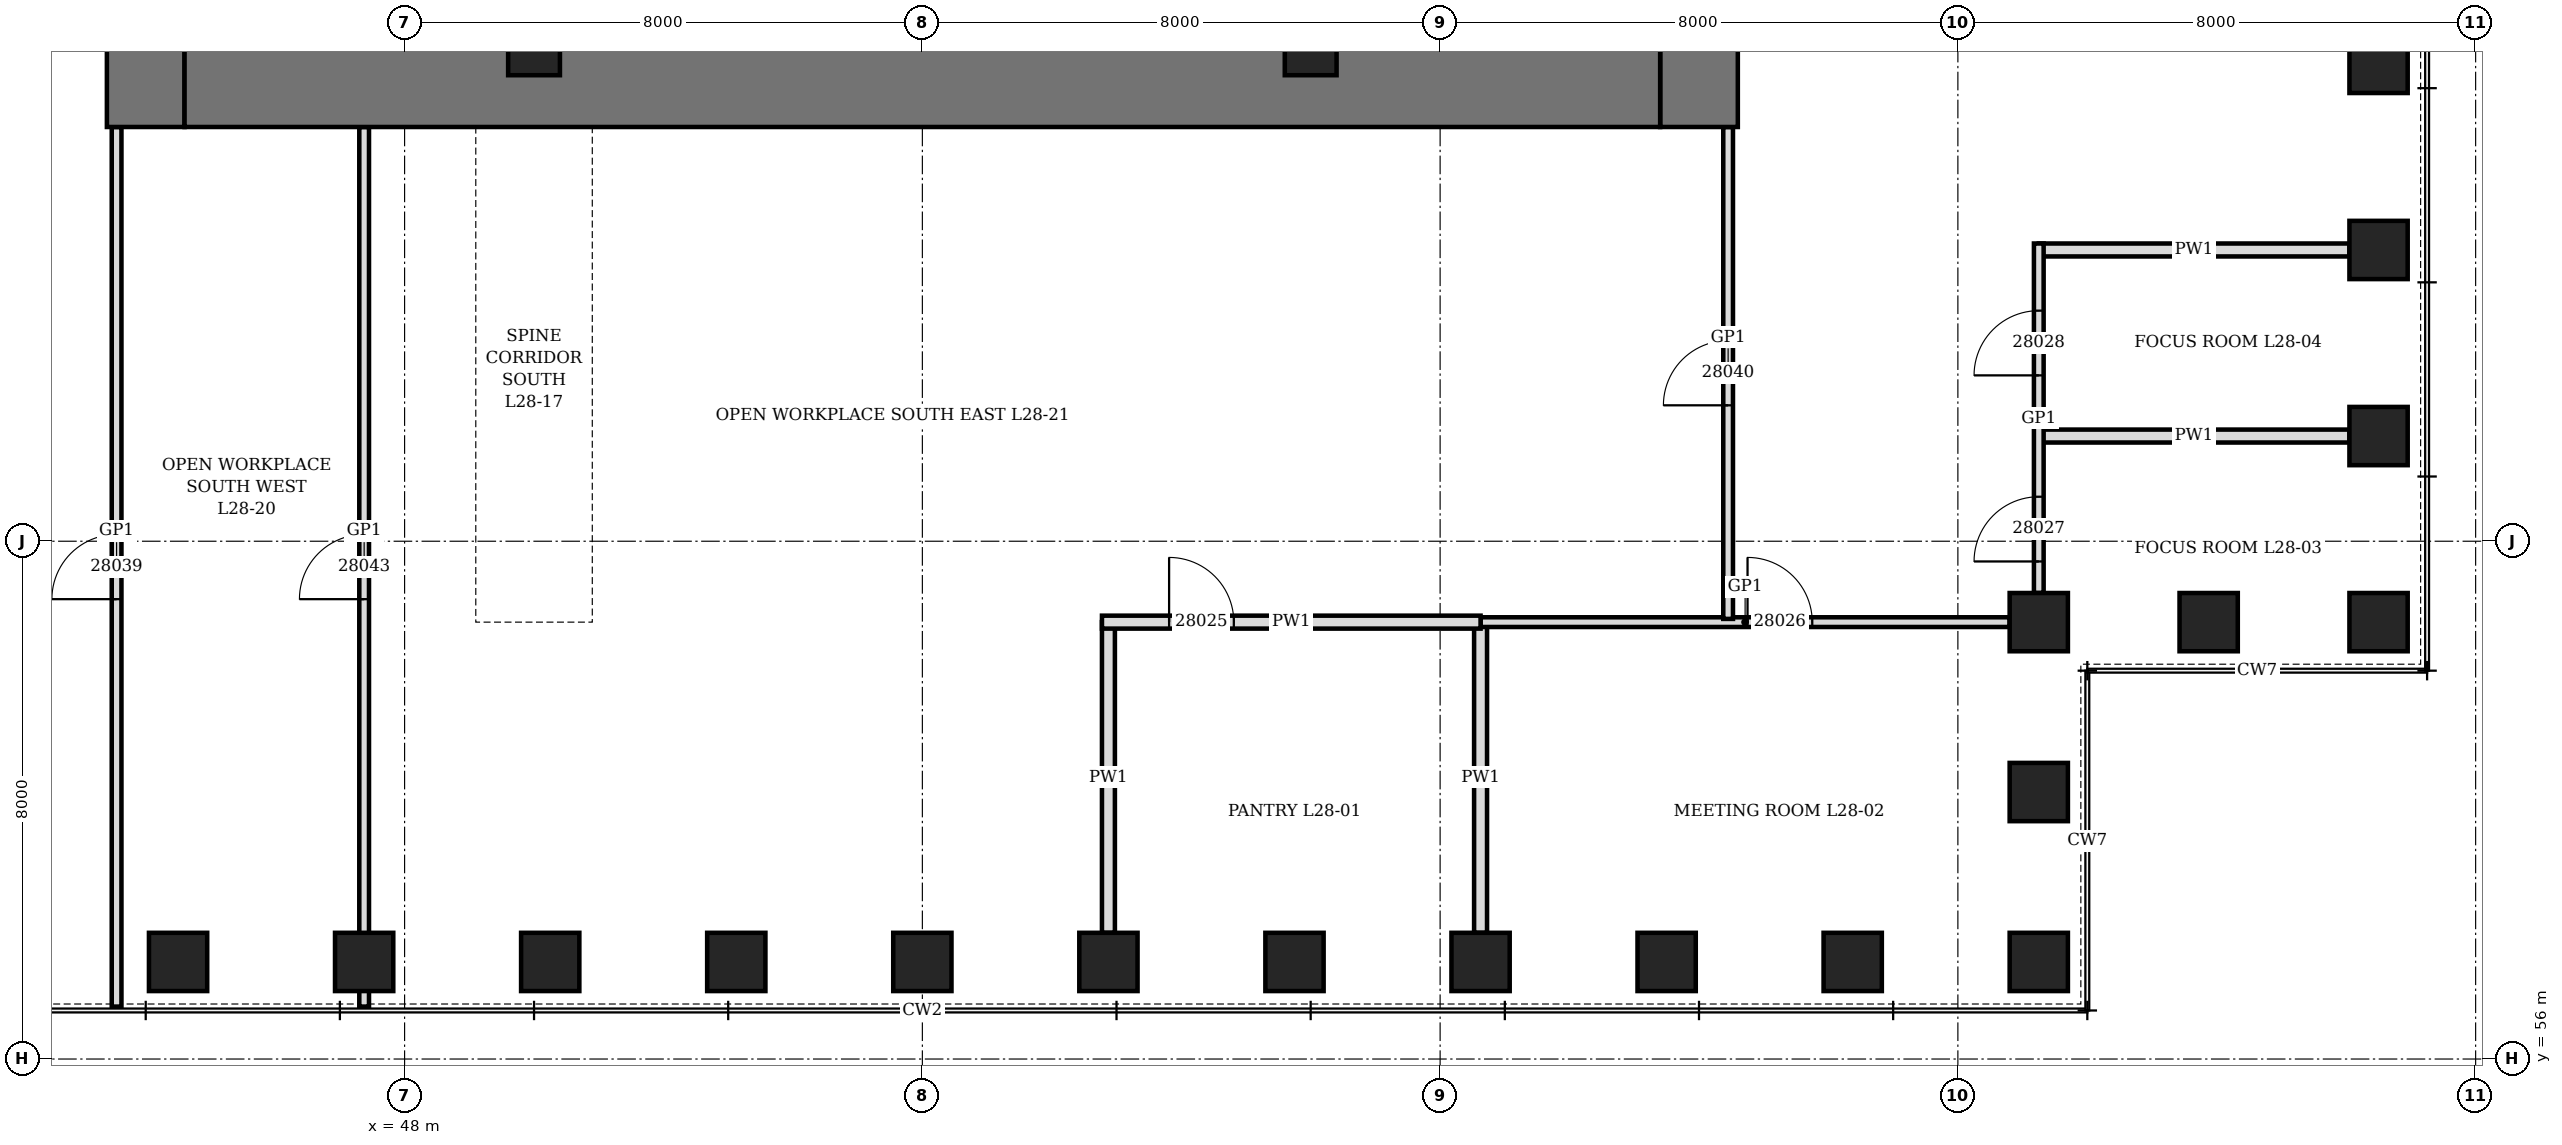
"""IFC4 building model, lengths in metres.
Left out: names, types, materials, properties, quantities, classifications, styles, units other than length and angle.
Written with IfcOpenShell. Run it as: python <this file> out.ifc"""

import sys

from ifc_helpers import new_model, si_unit, direction, frame, frame_2d, origin, origin_2d, place, context, subcontext, project, spatial, rectangle, hollow_rectangle, extrude, element, fill, save


model = new_model("IFC4")
c1 = context("Model", 3, precision=1e-05, world=origin(), true_north=direction((0.0, 1.0)))
c2 = subcontext(c1, "Body", "Model", "MODEL_VIEW")
j1 = project(units=[si_unit("LENGTHUNIT", "METRE"), si_unit("PLANEANGLEUNIT", "RADIAN")], contexts=[c1])
p1 = place(None, origin())
s1 = spatial("IfcSite", under=j1, at=p1, CompositionType="ELEMENT")
p2 = place(p1, origin())
s2 = spatial("IfcBuilding", under=s1, at=p2, CompositionType="ELEMENT")
p3 = place(p2, frame((0.0, 0.0, 129.1)))
s3 = spatial("IfcBuildingStorey", under=s2, at=p3, CompositionType="ELEMENT", Elevation=129.1)
for number, where, z_axis, x_axis in (
    (1, (44.5, 57.5, 0.0), (0.0, 0.0, 1.0), (1.0, 0.0, 0.0)),
    (2, (47.375, 57.5, 0.0), (0.0, 0.0, 1.0), (1.0, 0.0, 0.0)),
    (3, (50.25, 57.5, 0.0), (0.0, 0.0, 1.0), (1.0, 0.0, 0.0)),
    (4, (53.125, 57.5, 0.0), (0.0, 0.0, 1.0), (1.0, 0.0, 0.0)),
    (5, (56.0, 57.5, 0.0), (0.0, 0.0, 1.0), (1.0, 0.0, 0.0)),
    (6, (58.875, 57.5, 0.0), (0.0, 0.0, 1.0), (1.0, 0.0, 0.0)),
    (7, (61.75, 57.5, 0.0), (0.0, 0.0, 1.0), (1.0, 0.0, 0.0)),
    (8, (64.625, 57.5, 0.0), (0.0, 0.0, 1.0), (1.0, 0.0, 0.0)),
    (9, (67.5, 57.5, 0.0), (0.0, 0.0, 1.0), (1.0, 0.0, 0.0)),
    (10, (70.375, 57.5, 0.0), (0.0, 0.0, 1.0), (1.0, 0.0, 0.0)),
    (11, (73.25, 57.5, 0.0), (0.0, 0.0, 1.0), (0.0, 1.0, 0.0)),
    (12, (73.25, 60.125, 0.0), (0.0, 0.0, 1.0), (0.0, 1.0, 0.0)),
    (13, (73.25, 62.75, 0.0), (0.0, 0.0, 1.0), (1.0, 0.0, 0.0)),
    (14, (75.875, 62.75, 0.0), (0.0, 0.0, 1.0), (1.0, 0.0, 0.0)),
    (15, (78.5, 62.75, 0.0), (0.0, 0.0, 1.0), (0.0, 1.0, 0.0)),
    (16, (78.5, 65.625, 0.0), (0.0, 0.0, 1.0), (0.0, 1.0, 0.0)),
    (17, (78.5, 68.5, 0.0), (0.0, 0.0, 1.0), (0.0, 1.0, 0.0)),
    (18, (78.5, 71.375, 0.0), (0.0, 0.0, 1.0), (0.0, 1.0, 0.0)),
):
    element("IfcColumn", number, at=place(p3, frame(where, z_axis=z_axis, x_axis=x_axis)), inside=s3, PredefinedType="COLUMN", context=c2, shape_type="SweptSolid", body=[
        extrude(hollow_rectangle(XDim=0.9, YDim=0.9, WallThickness=0.15, at=origin_2d()), origin(), (0.0, 0.0, 1.0), 4.2),
    ])
p4 = place(p3, frame((44.0, 70.4, 0.0), z_axis=(0.0, 0.0, 1.0), x_axis=(0.0, 1.0, 0.0)))
e19 = element("IfcWall", 19, at=p4, inside=s3, PredefinedType="SHEAR", context=c2, shape_type="SweptSolid", body=[
    extrude(rectangle(XDim=19.2, YDim=1.2, at=frame_2d((9.6, 0.0))), origin(), (0.0, 0.0, 1.0), 4.2),
])
p5 = place(p4, frame((8.6, 0.0, 0.0)))
e20 = element("IfcOpeningElement", 20, at=p5, cuts=e19, PredefinedType="OPENING", context=c2, shape_type="SweptSolid", body=[
    extrude(rectangle(XDim=2.0, YDim=2.4, at=frame_2d((1.0, 1.2))), frame((0.0, 0.61, 0.0), z_axis=(0.0, -1.0, 0.0), x_axis=(1.0, 0.0, 0.0)), (0.0, 0.0, 1.0), 1.22),
])
p6 = place(p3, frame((68.0, 70.4, 0.0), z_axis=(0.0, 0.0, 1.0), x_axis=(0.0, 1.0, 0.0)))
e21 = element("IfcWall", 21, at=p6, inside=s3, PredefinedType="SHEAR", context=c2, shape_type="SweptSolid", body=[
    extrude(rectangle(XDim=19.2, YDim=1.2, at=frame_2d((9.6, 0.0))), origin(), (0.0, 0.0, 1.0), 4.2),
])
p7 = place(p6, frame((8.6, 0.0, 0.0)))
e22 = element("IfcOpeningElement", 22, at=p7, cuts=e21, PredefinedType="OPENING", context=c2, shape_type="SweptSolid", body=[
    extrude(rectangle(XDim=2.0, YDim=2.4, at=frame_2d((1.0, 1.2))), frame((0.0, 0.61, 0.0), z_axis=(0.0, -1.0, 0.0), x_axis=(1.0, 0.0, 0.0)), (0.0, 0.0, 1.0), 1.22),
])
p8 = place(p3, frame((44.6, 71.0, 0.0), z_axis=(0.0, 0.0, 1.0), x_axis=(1.0, 0.0, 0.0)))
e23 = element("IfcWall", 23, at=p8, inside=s3, PredefinedType="SHEAR", context=c2, shape_type="SweptSolid", body=[
    extrude(rectangle(XDim=22.8, YDim=1.2, at=frame_2d((11.4, 0.0))), origin(), (0.0, 0.0, 1.0), 4.2),
])
for number, where, z_axis, x_axis in (
    (24, (50.0, 71.6, 0.0), (0.0, 0.0, 1.0), (1.0, 0.0, 0.0)),
    (25, (62.0, 71.6, 0.0), (0.0, 0.0, 1.0), (1.0, 0.0, 0.0)),
):
    element("IfcColumn", number, at=place(p3, frame(where, z_axis=z_axis, x_axis=x_axis)), inside=s3, PredefinedType="COLUMN", context=c2, shape_type="SweptSolid", body=[
        extrude(hollow_rectangle(XDim=0.8, YDim=0.8, WallThickness=0.1, at=origin_2d()), origin(), (0.0, 0.0, 1.0), 4.2),
    ])
for number, where, z_axis, x_axis in (
    (26, (58.875, 57.95, 0.0), (0.0, 0.0, 1.0), (0.0, 1.0, 0.0)),
    (27, (64.625, 57.95, 0.0), (0.0, 0.0, 1.0), (0.0, 1.0, 0.0)),
):
    element("IfcWall", number, at=place(p3, frame(where, z_axis=z_axis, x_axis=x_axis)), inside=s3, PredefinedType="PARTITIONING", context=c2, shape_type="SweptSolid", body=[
        extrude(rectangle(XDim=4.8, YDim=0.2, at=frame_2d((2.4, 0.0))), origin(), (0.0, 0.0, 1.0), 3.278),
    ])
for number, where, z_axis, x_axis in (
    (28, (73.25, 65.625, 0.0), (0.0, 0.0, 1.0), (1.0, 0.0, 0.0)),
    (29, (73.25, 68.5, 0.0), (0.0, 0.0, 1.0), (1.0, 0.0, 0.0)),
):
    element("IfcWall", number, at=place(p3, frame(where, z_axis=z_axis, x_axis=x_axis)), inside=s3, PredefinedType="PARTITIONING", context=c2, shape_type="SweptSolid", body=[
        extrude(rectangle(XDim=4.8, YDim=0.2, at=frame_2d((2.4, 0.0))), origin(), (0.0, 0.0, 1.0), 3.428),
    ])
p9 = place(p3, frame((64.625, 62.75, 0.0), z_axis=(0.0, 0.0, 1.0), x_axis=(1.0, 0.0, 0.0)))
e30 = element("IfcWall", 30, at=p9, inside=s3, PredefinedType="PARTITIONING", context=c2, shape_type="SweptSolid", body=[
    extrude(rectangle(XDim=8.175, YDim=0.15, at=frame_2d((4.087, 0.0))), origin(), (0.0, 0.0, 1.0), 4.04),
])
p10 = place(p9, frame((4.125, 0.0, 0.0)))
e31 = element("IfcOpeningElement", 31, at=p10, cuts=e30, PredefinedType="OPENING", context=c2, shape_type="SweptSolid", body=[
    extrude(rectangle(XDim=1.0, YDim=2.4, at=frame_2d((0.5, 1.2))), frame((0.0, 0.085, 0.0), z_axis=(0.0, -1.0, 0.0), x_axis=(1.0, 0.0, 0.0)), (0.0, 0.0, 1.0), 0.17),
])
p11 = place(p3, frame((58.775, 62.75, 0.0), z_axis=(0.0, 0.0, 1.0), x_axis=(1.0, 0.0, 0.0)))
e32 = element("IfcWall", 32, at=p11, inside=s3, PredefinedType="PARTITIONING", context=c2, shape_type="SweptSolid", body=[
    extrude(rectangle(XDim=5.85, YDim=0.2, at=frame_2d((2.925, 0.0))), origin(), (0.0, 0.0, 1.0), 4.04),
])
p12 = place(p11, frame((1.038, 0.0, 0.0)))
e33 = element("IfcOpeningElement", 33, at=p12, cuts=e32, PredefinedType="OPENING", context=c2, shape_type="SweptSolid", body=[
    extrude(rectangle(XDim=1.0, YDim=2.1, at=frame_2d((0.5, 1.05))), frame((0.0, 0.11, 0.0), z_axis=(0.0, -1.0, 0.0), x_axis=(1.0, 0.0, 0.0)), (0.0, 0.0, 1.0), 0.22),
])
p13 = place(p3, frame((43.55, 56.81, 0.0), z_axis=(0.0, 0.0, 1.0), x_axis=(0.0, 1.0, 0.0)))
e34 = element("IfcWall", 34, at=p13, inside=s3, PredefinedType="PARTITIONING", context=c2, shape_type="SweptSolid", body=[
    extrude(rectangle(XDim=13.59, YDim=0.15, at=frame_2d((6.795, 0.0))), origin(), (0.0, 0.0, 1.0), 4.04),
])
p14 = place(p13, frame((6.295, 0.0, 0.0)))
e35 = element("IfcOpeningElement", 35, at=p14, cuts=e34, PredefinedType="OPENING", context=c2, shape_type="SweptSolid", body=[
    extrude(rectangle(XDim=1.0, YDim=2.4, at=frame_2d((0.5, 1.2))), frame((0.0, 0.085, 0.0), z_axis=(0.0, -1.0, 0.0), x_axis=(1.0, 0.0, 0.0)), (0.0, 0.0, 1.0), 0.17),
])
p15 = place(p3, frame((47.375, 56.81, 0.0), z_axis=(0.0, 0.0, 1.0), x_axis=(0.0, 1.0, 0.0)))
e36 = element("IfcWall", 36, at=p15, inside=s3, PredefinedType="PARTITIONING", context=c2, shape_type="SweptSolid", body=[
    extrude(rectangle(XDim=13.59, YDim=0.15, at=frame_2d((6.795, 0.0))), origin(), (0.0, 0.0, 1.0), 3.278),
])
p16 = place(p15, frame((6.295, 0.0, 0.0)))
e37 = element("IfcOpeningElement", 37, at=p16, cuts=e36, PredefinedType="OPENING", context=c2, shape_type="SweptSolid", body=[
    extrude(rectangle(XDim=1.0, YDim=2.4, at=frame_2d((0.5, 1.2))), frame((0.0, 0.085, 0.0), z_axis=(0.0, -1.0, 0.0), x_axis=(1.0, 0.0, 0.0)), (0.0, 0.0, 1.0), 0.17),
])
p17 = place(p3, frame((68.45, 62.8, 0.0), z_axis=(0.0, 0.0, 1.0), x_axis=(0.0, 1.0, 0.0)))
e38 = element("IfcWall", 38, at=p17, inside=s3, PredefinedType="PARTITIONING", context=c2, shape_type="SweptSolid", body=[
    extrude(rectangle(XDim=7.6, YDim=0.15, at=frame_2d((3.8, 0.0))), origin(), (0.0, 0.0, 1.0), 4.04),
])
p18 = place(p17, frame((3.3, 0.0, 0.0)))
e39 = element("IfcOpeningElement", 39, at=p18, cuts=e38, PredefinedType="OPENING", context=c2, shape_type="SweptSolid", body=[
    extrude(rectangle(XDim=1.0, YDim=2.4, at=frame_2d((0.5, 1.2))), frame((0.0, 0.085, 0.0), z_axis=(0.0, -1.0, 0.0), x_axis=(1.0, 0.0, 0.0)), (0.0, 0.0, 1.0), 0.17),
])
p19 = place(p3, frame((73.25, 63.2, 0.0), z_axis=(0.0, 0.0, 1.0), x_axis=(0.0, 1.0, 0.0)))
e40 = element("IfcWall", 40, at=p19, inside=s3, PredefinedType="PARTITIONING", context=c2, shape_type="SweptSolid", body=[
    extrude(rectangle(XDim=5.4, YDim=0.15, at=frame_2d((2.7, 0.0))), origin(), (0.0, 0.0, 1.0), 4.04),
])
p20 = place(p19, frame((0.488, 0.0, 0.0)))
e41 = element("IfcOpeningElement", 41, at=p20, cuts=e40, PredefinedType="OPENING", context=c2, shape_type="SweptSolid", body=[
    extrude(rectangle(XDim=1.0, YDim=2.4, at=frame_2d((0.5, 1.2))), frame((0.0, 0.085, 0.0), z_axis=(0.0, -1.0, 0.0), x_axis=(1.0, 0.0, 0.0)), (0.0, 0.0, 1.0), 0.17),
])
p21 = place(p19, frame((3.363, 0.0, 0.0)))
e42 = element("IfcOpeningElement", 42, at=p21, cuts=e40, PredefinedType="OPENING", context=c2, shape_type="SweptSolid", body=[
    extrude(rectangle(XDim=1.0, YDim=2.4, at=frame_2d((0.5, 1.2))), frame((0.0, 0.085, 0.0), z_axis=(0.0, -1.0, 0.0), x_axis=(1.0, 0.0, 0.0)), (0.0, 0.0, 1.0), 0.17),
])
p22 = place(p12, origin())
e43 = element("IfcDoor", 43, at=p22, inside=s3, OperationType="SINGLE_SWING_LEFT", PredefinedType="DOOR", context=c2, shape_type="SweptSolid", body=[
    extrude(rectangle(XDim=1.0, YDim=2.1, at=frame_2d((0.5, 1.05))), frame((0.0, 0.1, 0.0), z_axis=(0.0, -1.0, 0.0), x_axis=(1.0, 0.0, 0.0)), (0.0, 0.0, 1.0), 0.199),
])
fill(e33, e43)
p23 = place(p10, origin())
e44 = element("IfcDoor", 44, at=p23, inside=s3, OperationType="SINGLE_SWING_RIGHT", PredefinedType="DOOR", context=c2, shape_type="SweptSolid", body=[
    extrude(rectangle(XDim=1.0, YDim=2.4, at=frame_2d((0.5, 1.2))), frame((0.0, 0.075, 0.0), z_axis=(0.0, -1.0, 0.0), x_axis=(1.0, 0.0, 0.0)), (0.0, 0.0, 1.0), 0.149),
])
fill(e31, e44)
p24 = place(p20, origin())
e45 = element("IfcDoor", 45, at=p24, inside=s3, OperationType="SINGLE_SWING_RIGHT", PredefinedType="DOOR", context=c2, shape_type="SweptSolid", body=[
    extrude(rectangle(XDim=1.0, YDim=2.4, at=frame_2d((0.5, 1.2))), frame((0.0, 0.075, 0.0), z_axis=(0.0, -1.0, 0.0), x_axis=(1.0, 0.0, 0.0)), (0.0, 0.0, 1.0), 0.149),
])
fill(e41, e45)
p25 = place(p21, origin())
e46 = element("IfcDoor", 46, at=p25, inside=s3, OperationType="SINGLE_SWING_RIGHT", PredefinedType="DOOR", context=c2, shape_type="SweptSolid", body=[
    extrude(rectangle(XDim=1.0, YDim=2.4, at=frame_2d((0.5, 1.2))), frame((0.0, 0.075, 0.0), z_axis=(0.0, -1.0, 0.0), x_axis=(1.0, 0.0, 0.0)), (0.0, 0.0, 1.0), 0.149),
])
fill(e42, e46)
p26 = place(p14, origin())
e47 = element("IfcDoor", 47, at=p26, inside=s3, OperationType="SINGLE_SWING_RIGHT", PredefinedType="DOOR", context=c2, shape_type="SweptSolid", body=[
    extrude(rectangle(XDim=1.0, YDim=2.4, at=frame_2d((0.5, 1.2))), frame((0.0, 0.075, 0.0), z_axis=(0.0, -1.0, 0.0), x_axis=(1.0, 0.0, 0.0)), (0.0, 0.0, 1.0), 0.149),
])
fill(e35, e47)
p27 = place(p18, origin())
e48 = element("IfcDoor", 48, at=p27, inside=s3, OperationType="SINGLE_SWING_RIGHT", PredefinedType="DOOR", context=c2, shape_type="SweptSolid", body=[
    extrude(rectangle(XDim=1.0, YDim=2.4, at=frame_2d((0.5, 1.2))), frame((0.0, 0.075, 0.0), z_axis=(0.0, -1.0, 0.0), x_axis=(1.0, 0.0, 0.0)), (0.0, 0.0, 1.0), 0.149),
])
fill(e39, e48)
p28 = place(p16, origin())
e49 = element("IfcDoor", 49, at=p28, inside=s3, OperationType="SINGLE_SWING_RIGHT", PredefinedType="DOOR", context=c2, shape_type="SweptSolid", body=[
    extrude(rectangle(XDim=1.0, YDim=2.4, at=frame_2d((0.5, 1.2))), frame((0.0, 0.075, 0.0), z_axis=(0.0, -1.0, 0.0), x_axis=(1.0, 0.0, 0.0)), (0.0, 0.0, 1.0), 0.149),
])
fill(e37, e49)
save(model, sys.argv[1])
